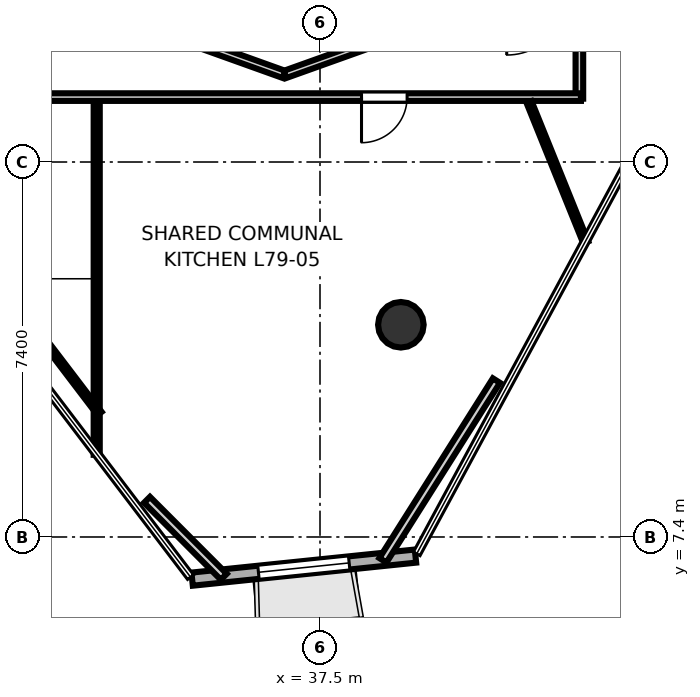
"""IFC4 building model, lengths in metres.
Left out: names, types, materials, properties, quantities, classifications, styles, units other than length and angle.
Written with IfcOpenShell. Run it as: python <this file> out.ifc"""

import sys

from ifc_helpers import new_model, si_unit, direction, frame, frame_2d, origin, origin_2d, place, context, subcontext, project, spatial, rectangle, hollow_circle, extrude, element, fill, save


model = new_model("IFC4")
c1 = context("Model", 3, precision=1e-05, world=origin(), true_north=direction((0.0, 1.0)))
c2 = subcontext(c1, "Body", "Model", "MODEL_VIEW")
j1 = project(units=[si_unit("LENGTHUNIT", "METRE"), si_unit("PLANEANGLEUNIT", "RADIAN")], contexts=[c1])
p1 = place(None, origin())
s1 = spatial("IfcSite", under=j1, at=p1, CompositionType="ELEMENT")
p2 = place(p1, origin())
s2 = spatial("IfcBuilding", under=s1, at=p2, CompositionType="ELEMENT")
p3 = place(p2, frame((0.0, 0.0, 306.5)))
s3 = spatial("IfcBuildingStorey", under=s2, at=p3, CompositionType="ELEMENT", Elevation=306.5)
p4 = place(p3, frame((39.096, 11.588, 0.0), z_axis=(0.0, 0.0, 1.0), x_axis=(1.0, 0.0, 0.0)))
e1 = element("IfcColumn", 1, at=p4, inside=s3, PredefinedType="COLUMN", context=c2, shape_type="SweptSolid", body=[
    extrude(hollow_circle(Radius=0.45, WallThickness=0.025, at=origin_2d()), origin(), (0.0, 0.0, 1.0), 3.7),
])
p5 = place(p3, frame((34.976, 6.568, 0.0), z_axis=(0.0, 0.0, 1.0), x_axis=(0.99471354849, 0.102688638369, 0.0)))
e2 = element("IfcWall", 2, at=p5, inside=s3, PredefinedType="SOLIDWALL", context=c2, shape_type="SweptSolid", body=[
    extrude(rectangle(XDim=4.432, YDim=0.26, at=frame_2d((2.216, 0.0))), origin(), (0.0, 0.0, 1.0), 3.52),
])
p6 = place(p5, frame((1.316, 0.0, 0.85)))
e3 = element("IfcOpeningElement", 3, at=p6, cuts=e2, PredefinedType="OPENING", context=c2, shape_type="SweptSolid", body=[
    extrude(rectangle(XDim=1.8, YDim=2.1, at=frame_2d((0.9, 1.05))), frame((0.0, 0.14, 0.0), z_axis=(0.0, -1.0, 0.0), x_axis=(1.0, 0.0, 0.0)), (0.0, 0.0, 1.0), 0.28),
])
p7 = place(p3, frame((33.458, 17.724, 0.0), z_axis=(0.0, 0.0, 1.0), x_axis=(0.94128854789, -0.337603124408, 0.0)))
e4 = element("IfcWall", 4, at=p7, inside=s3, PredefinedType="PARTITIONING", context=c2, shape_type="SweptSolid", body=[
    extrude(rectangle(XDim=3.54, YDim=0.15, at=frame_2d((1.77, 0.0))), origin(), (0.0, 0.0, 1.0), 2.84),
])
p8 = place(p3, frame((36.81, 16.529, 0.0), z_axis=(0.0, 0.0, 1.0), x_axis=(0.941548344365, 0.33687789364, 0.0)))
e5 = element("IfcWall", 5, at=p8, inside=s3, PredefinedType="PARTITIONING", context=c2, shape_type="SweptSolid", body=[
    extrude(rectangle(XDim=3.513, YDim=0.15, at=frame_2d((1.756, 0.0))), origin(), (0.0, 0.0, 1.0), 2.84),
])
p9 = place(p3, frame((42.619, 17.98, 0.0), z_axis=(0.0, 0.0, 1.0), x_axis=(0.0, -1.0, 0.0)))
e6 = element("IfcWall", 6, at=p9, inside=s3, PredefinedType="PARTITIONING", context=c2, shape_type="SweptSolid", body=[
    extrude(rectangle(XDim=1.93, YDim=0.15, at=frame_2d((0.965, 0.0))), origin(), (0.0, 0.0, 1.0), 2.84),
])
p10 = place(p3, frame((42.65, 16.081, 0.0), z_axis=(0.0, 0.0, 1.0), x_axis=(-1.0, 0.0, 0.0)))
e7 = element("IfcWall", 7, at=p10, inside=s3, PredefinedType="PARTITIONING", context=c2, shape_type="SweptSolid", body=[
    extrude(rectangle(XDim=12.85, YDim=0.15, at=frame_2d((6.425, 0.0))), origin(), (0.0, 0.0, 1.0), 2.84),
])
p11 = place(p10, frame((3.431, 0.0, 0.0)))
e8 = element("IfcOpeningElement", 8, at=p11, cuts=e7, PredefinedType="OPENING", context=c2, shape_type="SweptSolid", body=[
    extrude(rectangle(XDim=0.9, YDim=2.1, at=frame_2d((0.45, 1.05))), frame((0.0, 0.085, 0.0), z_axis=(0.0, -1.0, 0.0), x_axis=(1.0, 0.0, 0.0)), (0.0, 0.0, 1.0), 0.17),
])
p12 = place(p3, frame((33.093, 15.97, 0.0), z_axis=(0.0, 0.0, 1.0), x_axis=(0.0, -1.0, 0.0)))
e9 = element("IfcWall", 9, at=p12, inside=s3, PredefinedType="PARTITIONING", context=c2, shape_type="SweptSolid", body=[
    extrude(rectangle(XDim=6.948, YDim=0.12, at=frame_2d((3.474, 0.0))), origin(), (0.0, 0.0, 1.0), 2.84),
])
p13 = place(p3, frame((33.149, 9.837, 0.0), z_axis=(0.0, 0.0, 1.0), x_axis=(-0.605712382607, 0.795683674306, 0.0)))
e10 = element("IfcWall", 10, at=p13, inside=s3, PredefinedType="PARTITIONING", context=c2, shape_type="SweptSolid", body=[
    extrude(rectangle(XDim=11.942, YDim=0.105, at=frame_2d((5.971, 0.0))), origin(), (0.0, 0.0, 1.0), 2.84),
])
p14 = place(p3, frame((42.745, 13.214, 0.0), z_axis=(0.0, 0.0, 1.0), x_axis=(-0.374603689746, 0.92718502772, 0.0)))
e11 = element("IfcWall", 11, at=p14, inside=s3, PredefinedType="PARTITIONING", context=c2, shape_type="SweptSolid", body=[
    extrude(rectangle(XDim=2.985, YDim=0.105, at=frame_2d((1.492, 0.0))), origin(), (0.0, 0.0, 1.0), 2.84),
])
p15 = place(p3, frame((40.982, 10.487, 0.0), z_axis=(0.0, 0.0, 1.0), x_axis=(-0.534021459167, -0.84547092271, 0.0)))
e12 = element("IfcWall", 12, at=p15, inside=s3, PredefinedType="PLUMBINGWALL", context=c2, shape_type="SweptSolid", body=[
    extrude(rectangle(XDim=4.195, YDim=0.165, at=frame_2d((2.097, 0.0))), origin(), (0.0, 0.0, 1.0), 2.84),
])
p16 = place(p3, frame((35.601, 6.615, 0.0), z_axis=(0.0, 0.0, 1.0), x_axis=(-0.706423586707, 0.707789316212, 0.0)))
e13 = element("IfcWall", 13, at=p16, inside=s3, PredefinedType="PLUMBINGWALL", context=c2, shape_type="SweptSolid", body=[
    extrude(rectangle(XDim=2.145, YDim=0.165, at=frame_2d((1.073, 0.0))), origin(), (0.0, 0.0, 1.0), 2.84),
])
p17 = place(p11, origin())
e14 = element("IfcDoor", 14, at=p17, inside=s3, OperationType="SINGLE_SWING_RIGHT", PredefinedType="DOOR", context=c2, shape_type="SweptSolid", body=[
    extrude(rectangle(XDim=0.9, YDim=2.1, at=frame_2d((0.45, 1.05))), frame((0.0, 0.025, 0.0), z_axis=(0.0, -1.0, 0.0), x_axis=(1.0, 0.0, 0.0)), (0.0, 0.0, 1.0), 0.05),
])
fill(e8, e14)
p18 = place(p6, origin())
e15 = element("IfcWindow", 15, at=p18, inside=s3, PartitioningType="SINGLE_PANEL", PredefinedType="WINDOW", context=c2, shape_type="SweptSolid", body=[
    extrude(rectangle(XDim=1.8, YDim=2.1, at=frame_2d((0.9, 1.05))), frame((0.0, 0.03, 0.0), z_axis=(0.0, -1.0, 0.0), x_axis=(1.0, 0.0, 0.0)), (0.0, 0.0, 1.0), 0.06),
])
fill(e3, e15)
save(model, sys.argv[1])
